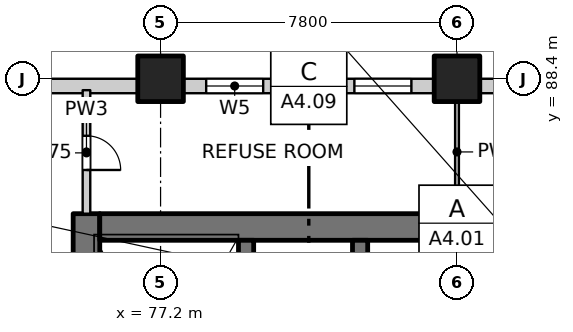
"""IFC4 building model, lengths in metres.
Left out: names, types, materials, properties, quantities, classifications, styles, units other than length and angle.
Written with IfcOpenShell. Run it as: python <this file> out.ifc"""

import sys

from ifc_helpers import new_model, si_unit, direction, frame, frame_2d, origin, origin_2d, place, context, subcontext, project, spatial, rectangle, extrude, element, fill, save


model = new_model("IFC4")
c1 = context("Model", 3, precision=1e-05, world=origin(), true_north=direction((0.0, 1.0)))
c2 = subcontext(c1, "Body", "Model", "MODEL_VIEW")
j1 = project(units=[si_unit("LENGTHUNIT", "METRE"), si_unit("PLANEANGLEUNIT", "RADIAN")], contexts=[c1])
p1 = place(None, origin())
s1 = spatial("IfcSite", under=j1, at=p1, CompositionType="ELEMENT")
p2 = place(p1, origin())
s2 = spatial("IfcBuilding", under=s1, at=p2, CompositionType="ELEMENT")
p3 = place(p2, frame((0.0, 0.0, 6.0)))
s3 = spatial("IfcBuildingStorey", under=s2, at=p3, CompositionType="ELEMENT", Elevation=6.0)
for number, where, z_axis, x_axis in (
    (1, (77.2, 88.4, -0.3), (0.0, 0.0, 1.0), (1.0, 0.0, 0.0)),
    (2, (85.0, 88.4, -0.3), (0.0, 0.0, 1.0), (1.0, 0.0, 0.0)),
):
    element("IfcColumn", number, at=place(p3, frame(where, z_axis=z_axis, x_axis=x_axis)), inside=s3, PredefinedType="COLUMN", context=c2, shape_type="SweptSolid", body=[
        extrude(rectangle(XDim=1.2, YDim=1.2, at=origin_2d()), origin(), (0.0, 0.0, 1.0), 4.5),
    ])
p4 = place(p3, frame((75.25, 77.3, -0.3), z_axis=(0.0, 0.0, 1.0), x_axis=(0.0, 1.0, 0.0)))
e3 = element("IfcWall", 3, at=p4, inside=s3, PredefinedType="SOLIDWALL", context=c2, shape_type="SweptSolid", body=[
    extrude(rectangle(XDim=7.55, YDim=0.7, at=frame_2d((3.775, 0.0))), origin(), (0.0, 0.0, 1.0), 4.5),
])
p5 = place(p4, frame((0.3, 0.0, 0.3)))
e4 = element("IfcOpeningElement", 4, at=p5, cuts=e3, PredefinedType="OPENING", context=c2, shape_type="SweptSolid", body=[
    extrude(rectangle(XDim=1.2, YDim=2.1, at=frame_2d((0.6, 1.05))), frame((0.0, 0.36, 0.0), z_axis=(0.0, -1.0, 0.0), x_axis=(1.0, 0.0, 0.0)), (0.0, 0.0, 1.0), 0.72),
])
p6 = place(p3, frame((75.6, 84.5, -0.3), z_axis=(0.0, 0.0, 1.0), x_axis=(1.0, 0.0, 0.0)))
e5 = element("IfcWall", 5, at=p6, inside=s3, PredefinedType="SOLIDWALL", context=c2, shape_type="SweptSolid", body=[
    extrude(rectangle(XDim=18.8, YDim=0.7, at=frame_2d((9.4, 0.0))), origin(), (0.0, 0.0, 1.0), 4.5),
])
p7 = place(p3, frame((79.45, 77.3, -0.3), z_axis=(0.0, 0.0, 1.0), x_axis=(0.0, 1.0, 0.0)))
e6 = element("IfcWall", 6, at=p7, inside=s3, PredefinedType="SOLIDWALL", context=c2, shape_type="SweptSolid", body=[
    extrude(rectangle(XDim=6.85, YDim=0.4, at=frame_2d((3.425, 0.0))), origin(), (0.0, 0.0, 1.0), 4.5),
])
p8 = place(p3, frame((82.45, 82.1, -0.3), z_axis=(0.0, 0.0, 1.0), x_axis=(0.0, 1.0, 0.0)))
e7 = element("IfcWall", 7, at=p8, inside=s3, PredefinedType="SOLIDWALL", context=c2, shape_type="SweptSolid", body=[
    extrude(rectangle(XDim=2.05, YDim=0.4, at=frame_2d((1.025, 0.0))), origin(), (0.0, 0.0, 1.0), 4.5),
])
p9 = place(p8, frame((0.65, 0.0, 0.3)))
e8 = element("IfcOpeningElement", 8, at=p9, cuts=e7, PredefinedType="OPENING", context=c2, shape_type="SweptSolid", body=[
    extrude(rectangle(XDim=0.9, YDim=2.1, at=frame_2d((0.45, 1.05))), frame((0.0, 0.21, 0.0), z_axis=(0.0, -1.0, 0.0), x_axis=(1.0, 0.0, 0.0)), (0.0, 0.0, 1.0), 0.42),
])
p10 = place(p3, frame((70.0, 88.21, 0.0), z_axis=(0.0, 0.0, 1.0), x_axis=(1.0, 0.0, 0.0)))
e9 = element("IfcWall", 9, at=p10, inside=s3, PredefinedType="SOLIDWALL", context=c2, shape_type="SweptSolid", body=[
    extrude(rectangle(XDim=6.6, YDim=0.38, at=frame_2d((3.3, 0.0))), origin(), (0.0, 0.0, 1.0), 4.2),
])
p11 = place(p10, frame((0.6, 0.0, 0.9)))
e10 = element("IfcOpeningElement", 10, at=p11, cuts=e9, PredefinedType="OPENING", context=c2, shape_type="SweptSolid", body=[
    extrude(rectangle(XDim=1.5, YDim=1.5, at=frame_2d((0.75, 0.75))), frame((0.0, 0.2, 0.0), z_axis=(0.0, -1.0, 0.0), x_axis=(1.0, 0.0, 0.0)), (0.0, 0.0, 1.0), 0.4),
])
p12 = place(p3, frame((77.8, 88.21, 0.0), z_axis=(0.0, 0.0, 1.0), x_axis=(1.0, 0.0, 0.0)))
e11 = element("IfcWall", 11, at=p12, inside=s3, PredefinedType="SOLIDWALL", context=c2, shape_type="SweptSolid", body=[
    extrude(rectangle(XDim=6.6, YDim=0.38, at=frame_2d((3.3, 0.0))), origin(), (0.0, 0.0, 1.0), 4.2),
])
p13 = place(p12, frame((0.6, 0.0, 0.9)))
e12 = element("IfcOpeningElement", 12, at=p13, cuts=e11, PredefinedType="OPENING", context=c2, shape_type="SweptSolid", body=[
    extrude(rectangle(XDim=1.5, YDim=1.5, at=frame_2d((0.75, 0.75))), frame((0.0, 0.2, 0.0), z_axis=(0.0, -1.0, 0.0), x_axis=(1.0, 0.0, 0.0)), (0.0, 0.0, 1.0), 0.4),
])
p14 = place(p12, frame((4.5, 0.0, 0.9)))
e13 = element("IfcOpeningElement", 13, at=p14, cuts=e11, PredefinedType="OPENING", context=c2, shape_type="SweptSolid", body=[
    extrude(rectangle(XDim=1.5, YDim=1.5, at=frame_2d((0.75, 0.75))), frame((0.0, 0.2, 0.0), z_axis=(0.0, -1.0, 0.0), x_axis=(1.0, 0.0, 0.0)), (0.0, 0.0, 1.0), 0.4),
])
p15 = place(p3, frame((85.6, 88.21, 0.0), z_axis=(0.0, 0.0, 1.0), x_axis=(1.0, 0.0, 0.0)))
e14 = element("IfcWall", 14, at=p15, inside=s3, PredefinedType="SOLIDWALL", context=c2, shape_type="SweptSolid", body=[
    extrude(rectangle(XDim=6.6, YDim=0.38, at=frame_2d((3.3, 0.0))), origin(), (0.0, 0.0, 1.0), 4.2),
])
p16 = place(p15, frame((0.6, 0.0, 0.9)))
e15 = element("IfcOpeningElement", 15, at=p16, cuts=e14, PredefinedType="OPENING", context=c2, shape_type="SweptSolid", body=[
    extrude(rectangle(XDim=1.5, YDim=1.5, at=frame_2d((0.75, 0.75))), frame((0.0, 0.2, 0.0), z_axis=(0.0, -1.0, 0.0), x_axis=(1.0, 0.0, 0.0)), (0.0, 0.0, 1.0), 0.4),
])
p17 = place(p15, frame((4.5, 0.0, 0.9)))
e16 = element("IfcOpeningElement", 16, at=p17, cuts=e14, PredefinedType="OPENING", context=c2, shape_type="SweptSolid", body=[
    extrude(rectangle(XDim=1.5, YDim=1.5, at=frame_2d((0.75, 0.75))), frame((0.0, 0.2, 0.0), z_axis=(0.0, -1.0, 0.0), x_axis=(1.0, 0.0, 0.0)), (0.0, 0.0, 1.0), 0.4),
])
p18 = place(p3, frame((75.25, 84.85, 0.0), z_axis=(0.0, 0.0, 1.0), x_axis=(0.0, 1.0, 0.0)))
e17 = element("IfcWall", 17, at=p18, inside=s3, PredefinedType="PARTITIONING", context=c2, shape_type="SweptSolid", body=[
    extrude(rectangle(XDim=3.25, YDim=0.2, at=frame_2d((1.625, 0.0))), origin(), (0.0, 0.0, 1.0), 4.2),
])
p19 = place(p18, frame((1.15, 0.0, 0.0)))
e18 = element("IfcOpeningElement", 18, at=p19, cuts=e17, PredefinedType="OPENING", context=c2, shape_type="SweptSolid", body=[
    extrude(rectangle(XDim=0.9, YDim=2.1, at=frame_2d((0.45, 1.05))), frame((0.0, 0.11, 0.0), z_axis=(0.0, -1.0, 0.0), x_axis=(1.0, 0.0, 0.0)), (0.0, 0.0, 1.0), 0.22),
])
p20 = place(p3, frame((85.0, 84.85, 0.0), z_axis=(0.0, 0.0, 1.0), x_axis=(0.0, 1.0, 0.0)))
e19 = element("IfcWall", 19, at=p20, inside=s3, PredefinedType="PARTITIONING", context=c2, shape_type="SweptSolid", body=[
    extrude(rectangle(XDim=3.25, YDim=0.1, at=frame_2d((1.625, 0.0))), origin(), (0.0, 0.0, 1.0), 4.2),
])
p21 = place(p13, origin())
e20 = element("IfcWindow", 20, at=p21, inside=s3, PartitioningType="SINGLE_PANEL", PredefinedType="WINDOW", context=c2, shape_type="SweptSolid", body=[
    extrude(rectangle(XDim=1.5, YDim=1.5, at=frame_2d((0.75, 0.75))), frame((0.0, 0.03, 0.0), z_axis=(0.0, -1.0, 0.0), x_axis=(1.0, 0.0, 0.0)), (0.0, 0.0, 1.0), 0.06),
])
fill(e12, e20)
p22 = place(p14, origin())
e21 = element("IfcWindow", 21, at=p22, inside=s3, PartitioningType="SINGLE_PANEL", PredefinedType="WINDOW", context=c2, shape_type="SweptSolid", body=[
    extrude(rectangle(XDim=1.5, YDim=1.5, at=frame_2d((0.75, 0.75))), frame((0.0, 0.03, 0.0), z_axis=(0.0, -1.0, 0.0), x_axis=(1.0, 0.0, 0.0)), (0.0, 0.0, 1.0), 0.06),
])
fill(e13, e21)
p23 = place(p19, origin())
e22 = element("IfcDoor", 22, at=p23, inside=s3, OperationType="SINGLE_SWING_RIGHT", PredefinedType="DOOR", context=c2, shape_type="SweptSolid", body=[
    extrude(rectangle(XDim=0.9, YDim=2.1, at=frame_2d((0.45, 1.05))), frame((0.0, 0.025, 0.0), z_axis=(0.0, -1.0, 0.0), x_axis=(1.0, 0.0, 0.0)), (0.0, 0.0, 1.0), 0.05),
])
fill(e18, e22)
save(model, sys.argv[1])
